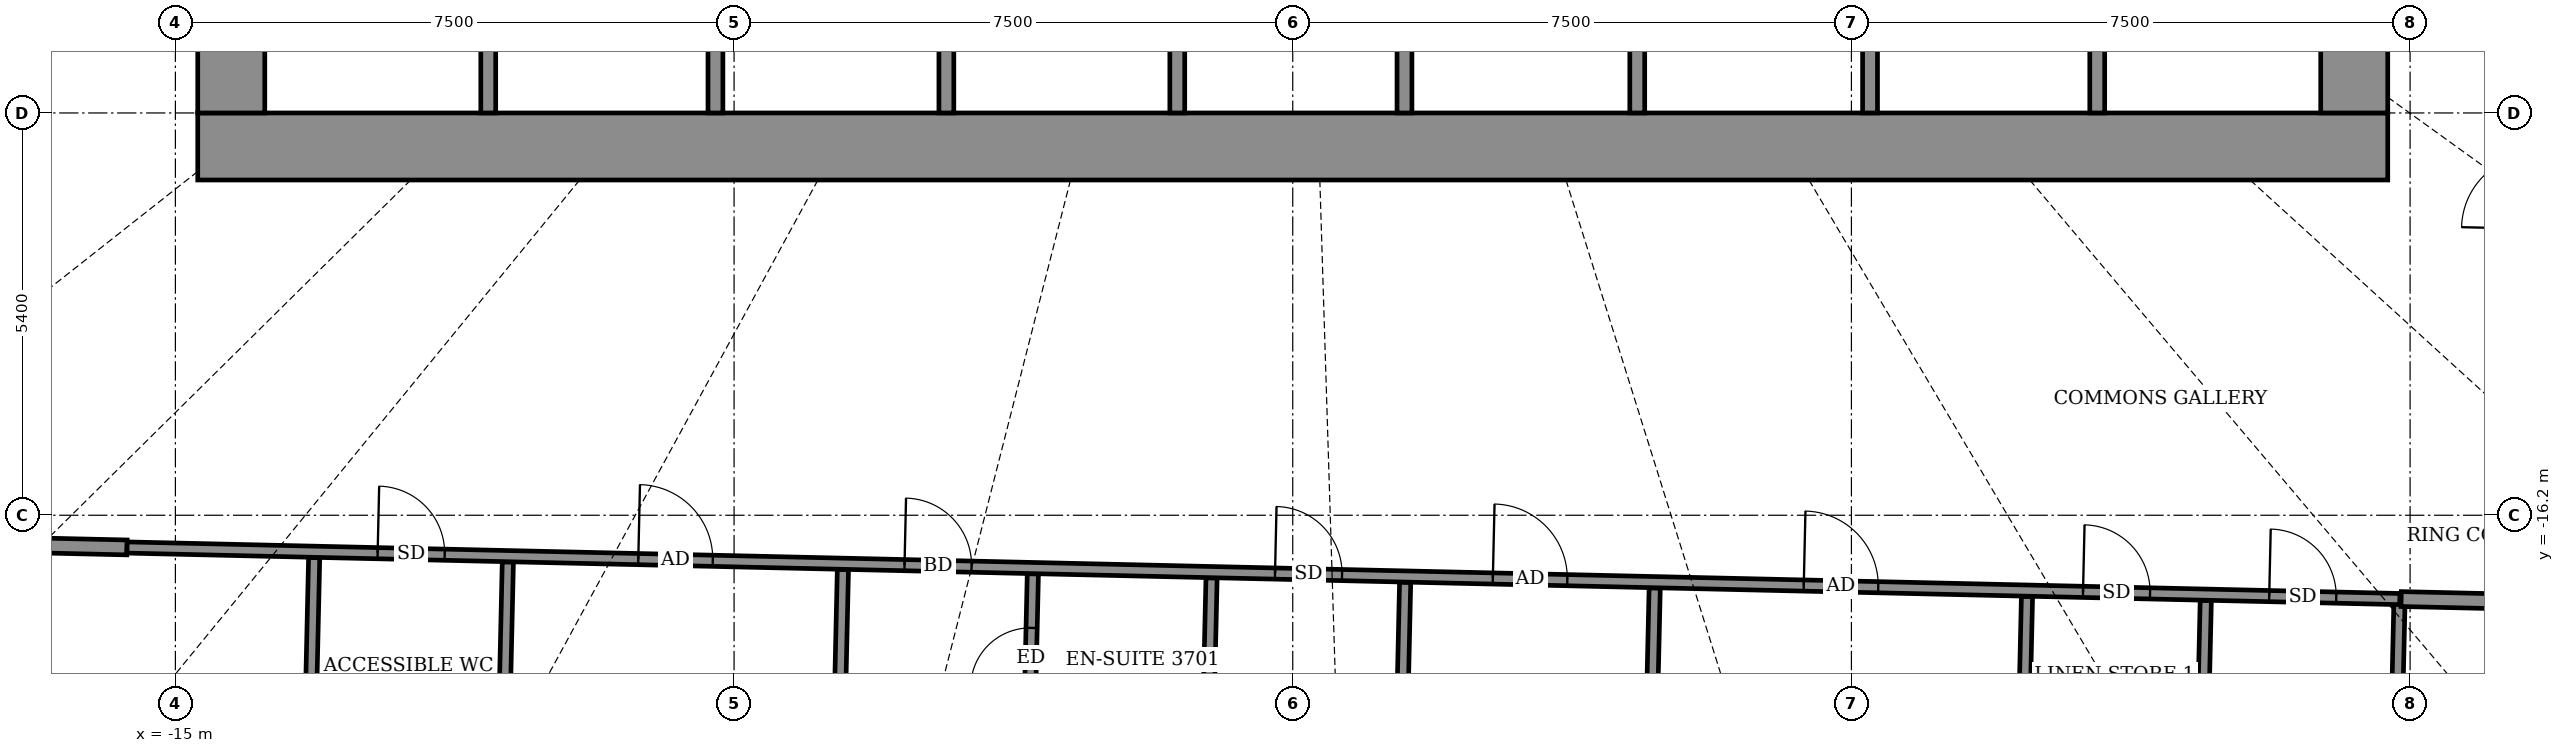
"""IFC4 building model, lengths in metres.
Left out: names, types, materials, properties, quantities, classifications, styles, units other than length and angle.
Written with IfcOpenShell. Run it as: python <this file> out.ifc"""

import sys

from ifc_helpers import new_model, si_unit, direction, frame, frame_2d, origin, place, context, subcontext, project, spatial, rectangle, extrude, element, fill, save


model = new_model("IFC4")
c1 = context("Model", 3, precision=1e-05, world=origin(), true_north=direction((0.0, 1.0)))
c2 = subcontext(c1, "Body", "Model", "MODEL_VIEW")
j1 = project(units=[si_unit("LENGTHUNIT", "METRE"), si_unit("PLANEANGLEUNIT", "RADIAN")], contexts=[c1])
p1 = place(None, origin())
s1 = spatial("IfcSite", under=j1, at=p1, CompositionType="ELEMENT")
p2 = place(p1, origin())
s2 = spatial("IfcBuilding", under=s1, at=p2, CompositionType="ELEMENT")
p3 = place(p2, frame((0.0, 0.0, 148.1)))
s3 = spatial("IfcBuildingStorey", under=s2, at=p3, CompositionType="ELEMENT", Elevation=148.1)
p4 = place(p3, frame((-10.686, -23.377, 0.0), z_axis=(0.0, 0.0, 1.0), x_axis=(0.022734104141, 0.999741546855, 0.0)))
e1 = element("IfcWall", 1, at=p4, inside=s3, PredefinedType="PARTITIONING", context=c2, shape_type="SweptSolid", body=[
    extrude(rectangle(XDim=6.551, YDim=0.15, at=frame_2d((3.275, 0.0))), origin(), (0.0, 0.0, 1.0), 2.65),
])
p5 = place(p3, frame((-6.187, -23.479, 0.0), z_axis=(0.0, 0.0, 1.0), x_axis=(0.022585104341, 0.999744923999, 0.0)))
e2 = element("IfcWall", 2, at=p5, inside=s3, PredefinedType="PARTITIONING", context=c2, shape_type="SweptSolid", body=[
    extrude(rectangle(XDim=6.551, YDim=0.15, at=frame_2d((3.275, 0.0))), origin(), (0.0, 0.0, 1.0), 2.75),
])
p6 = place(p3, frame((-1.239, -23.591, 0.0), z_axis=(0.0, 0.0, 1.0), x_axis=(0.022734104141, 0.999741546855, 0.0)))
e3 = element("IfcWall", 3, at=p6, inside=s3, PredefinedType="PARTITIONING", context=c2, shape_type="SweptSolid", body=[
    extrude(rectangle(XDim=6.551, YDim=0.15, at=frame_2d((3.275, 0.0))), origin(), (0.0, 0.0, 1.0), 4.05),
])
p7 = place(p3, frame((4.71, -23.726, 0.0), z_axis=(0.0, 0.0, 1.0), x_axis=(0.022734104141, 0.999741546855, 0.0)))
e4 = element("IfcWall", 4, at=p7, inside=s3, PredefinedType="PARTITIONING", context=c2, shape_type="SweptSolid", body=[
    extrude(rectangle(XDim=6.551, YDim=0.15, at=frame_2d((3.275, 0.0))), origin(), (0.0, 0.0, 1.0), 2.75),
])
p8 = place(p3, frame((12.108, -23.894, 0.0), z_axis=(0.0, 0.0, 1.0), x_axis=(0.022771353855, 0.999740699103, 0.0)))
e5 = element("IfcWall", 5, at=p8, inside=s3, PredefinedType="PARTITIONING", context=c2, shape_type="SweptSolid", body=[
    extrude(rectangle(XDim=6.551, YDim=0.15, at=frame_2d((3.275, 0.0))), origin(), (0.0, 0.0, 1.0), 2.65),
])
p9 = place(p3, frame((-13.203, -19.693, 0.0), z_axis=(0.0, 0.0, 1.0), x_axis=(0.022537481811, 0.999745998698, 0.0)))
e6 = element("IfcWall", 6, at=p9, inside=s3, PredefinedType="PARTITIONING", context=c2, shape_type="SweptSolid", body=[
    extrude(rectangle(XDim=2.925, YDim=0.15, at=frame_2d((1.462, 0.0))), origin(), (0.0, 0.0, 1.0), 2.45),
])
p10 = place(p3, frame((1.443, -20.025, 0.0), z_axis=(0.0, 0.0, 1.0), x_axis=(0.022539362742, 0.999745956294, 0.0)))
e7 = element("IfcWall", 7, at=p10, inside=s3, PredefinedType="PARTITIONING", context=c2, shape_type="SweptSolid", body=[
    extrude(rectangle(XDim=2.925, YDim=0.15, at=frame_2d((1.462, 0.0))), origin(), (0.0, 0.0, 1.0), 4.05),
])
p11 = place(p3, frame((14.79, -20.328, 0.0), z_axis=(0.0, 0.0, 1.0), x_axis=(0.02262711266, 0.999743974112, 0.0)))
e8 = element("IfcWall", 8, at=p11, inside=s3, PredefinedType="PARTITIONING", context=c2, shape_type="SweptSolid", body=[
    extrude(rectangle(XDim=3.0, YDim=0.15, at=frame_2d((1.5, 0.0))), origin(), (0.0, 0.0, 1.0), 2.65),
])
p12 = place(p3, frame((-3.542, -19.312, 0.0), z_axis=(0.0, 0.0, 1.0), x_axis=(0.022781023197, 0.999740478815, 0.0)))
e9 = element("IfcWall", 9, at=p12, inside=s3, PredefinedType="PARTITIONING", context=c2, shape_type="SweptSolid", body=[
    extrude(rectangle(XDim=2.325, YDim=0.15, at=frame_2d((1.163, 0.0))), origin(), (0.0, 0.0, 1.0), 4.05),
])
p13 = place(p12, frame((0.8, 0.0, 0.0)))
e10 = element("IfcOpeningElement", 10, at=p13, cuts=e9, PredefinedType="OPENING", context=c2, shape_type="SweptSolid", body=[
    extrude(rectangle(XDim=0.8, YDim=2.1, at=frame_2d((0.4, 1.05))), frame((0.0, 0.085, 0.0), z_axis=(0.0, -1.0, 0.0), x_axis=(1.0, 0.0, 0.0)), (0.0, 0.0, 1.0), 0.17),
])
p14 = place(p3, frame((9.809, -19.415, 0.0), z_axis=(0.0, 0.0, 1.0), x_axis=(0.02251267524, 0.99974655761, 0.0)))
e11 = element("IfcWall", 11, at=p14, inside=s3, PredefinedType="PARTITIONING", context=c2, shape_type="SweptSolid", body=[
    extrude(rectangle(XDim=2.125, YDim=0.15, at=frame_2d((1.063, 0.0))), origin(), (0.0, 0.0, 1.0), 2.65),
])
p15 = place(p3, frame((-21.983, -16.489, 0.0), z_axis=(0.0, 0.0, 1.0), x_axis=(0.999744930163, -0.022584831499, 0.0)))
e12 = element("IfcWall", 12, at=p15, inside=s3, PredefinedType="PARTITIONING", context=c2, shape_type="SweptSolid", body=[
    extrude(rectangle(XDim=6.335, YDim=0.2, at=frame_2d((3.167, 0.0))), origin(), (0.0, 0.0, 1.0), 2.55),
])
p16 = place(p15, frame((3.225, 0.0, 0.0)))
e13 = element("IfcOpeningElement", 13, at=p16, cuts=e12, PredefinedType="OPENING", context=c2, shape_type="SweptSolid", body=[
    extrude(rectangle(XDim=1.0, YDim=2.1, at=frame_2d((0.5, 1.05))), frame((0.0, 0.11, 0.0), z_axis=(0.0, -1.0, 0.0), x_axis=(1.0, 0.0, 0.0)), (0.0, 0.0, 1.0), 0.22),
])
p17 = place(p3, frame((-15.649, -16.633, 0.0), z_axis=(0.0, 0.0, 1.0), x_axis=(0.999742978268, -0.022671069754, 0.0)))
e14 = element("IfcWall", 14, at=p17, inside=s3, PredefinedType="PARTITIONING", context=c2, shape_type="SweptSolid", body=[
    extrude(rectangle(XDim=30.519, YDim=0.15, at=frame_2d((15.259, 0.0))), origin(), (0.0, 0.0, 1.0), 2.45),
])
p18 = place(p17, frame((3.365, 0.0, 0.0)))
e15 = element("IfcOpeningElement", 15, at=p18, cuts=e14, PredefinedType="OPENING", context=c2, shape_type="SweptSolid", body=[
    extrude(rectangle(XDim=0.9, YDim=2.1, at=frame_2d((0.45, 1.05))), frame((0.0, 0.085, 0.0), z_axis=(0.0, -1.0, 0.0), x_axis=(1.0, 0.0, 0.0)), (0.0, 0.0, 1.0), 0.17),
])
p19 = place(p17, frame((6.865, 0.0, 0.0)))
e16 = element("IfcOpeningElement", 16, at=p19, cuts=e14, PredefinedType="OPENING", context=c2, shape_type="SweptSolid", body=[
    extrude(rectangle(XDim=1.0, YDim=2.1, at=frame_2d((0.5, 1.05))), frame((0.0, 0.085, 0.0), z_axis=(0.0, -1.0, 0.0), x_axis=(1.0, 0.0, 0.0)), (0.0, 0.0, 1.0), 0.17),
])
p20 = place(p17, frame((10.44, 0.0, 0.0)))
e17 = element("IfcOpeningElement", 17, at=p20, cuts=e14, PredefinedType="OPENING", context=c2, shape_type="SweptSolid", body=[
    extrude(rectangle(XDim=0.9, YDim=2.1, at=frame_2d((0.45, 1.05))), frame((0.0, 0.085, 0.0), z_axis=(0.0, -1.0, 0.0), x_axis=(1.0, 0.0, 0.0)), (0.0, 0.0, 1.0), 0.17),
])
p21 = place(p17, frame((18.34, 0.0, 0.0)))
e18 = element("IfcOpeningElement", 18, at=p21, cuts=e14, PredefinedType="OPENING", context=c2, shape_type="SweptSolid", body=[
    extrude(rectangle(XDim=1.0, YDim=2.1, at=frame_2d((0.5, 1.05))), frame((0.0, 0.085, 0.0), z_axis=(0.0, -1.0, 0.0), x_axis=(1.0, 0.0, 0.0)), (0.0, 0.0, 1.0), 0.17),
])
p22 = place(p17, frame((15.415, 0.0, 0.0)))
e19 = element("IfcOpeningElement", 19, at=p22, cuts=e14, PredefinedType="OPENING", context=c2, shape_type="SweptSolid", body=[
    extrude(rectangle(XDim=0.9, YDim=2.1, at=frame_2d((0.45, 1.05))), frame((0.0, 0.085, 0.0), z_axis=(0.0, -1.0, 0.0), x_axis=(1.0, 0.0, 0.0)), (0.0, 0.0, 1.0), 0.17),
])
p23 = place(p17, frame((22.515, 0.0, 0.0)))
e20 = element("IfcOpeningElement", 20, at=p23, cuts=e14, PredefinedType="OPENING", context=c2, shape_type="SweptSolid", body=[
    extrude(rectangle(XDim=1.0, YDim=2.1, at=frame_2d((0.5, 1.05))), frame((0.0, 0.085, 0.0), z_axis=(0.0, -1.0, 0.0), x_axis=(1.0, 0.0, 0.0)), (0.0, 0.0, 1.0), 0.17),
])
p24 = place(p17, frame((26.265, 0.0, 0.0)))
e21 = element("IfcOpeningElement", 21, at=p24, cuts=e14, PredefinedType="OPENING", context=c2, shape_type="SweptSolid", body=[
    extrude(rectangle(XDim=0.9, YDim=2.1, at=frame_2d((0.45, 1.05))), frame((0.0, 0.085, 0.0), z_axis=(0.0, -1.0, 0.0), x_axis=(1.0, 0.0, 0.0)), (0.0, 0.0, 1.0), 0.17),
])
p25 = place(p17, frame((28.765, 0.0, 0.0)))
e22 = element("IfcOpeningElement", 22, at=p25, cuts=e14, PredefinedType="OPENING", context=c2, shape_type="SweptSolid", body=[
    extrude(rectangle(XDim=0.9, YDim=2.1, at=frame_2d((0.45, 1.05))), frame((0.0, 0.085, 0.0), z_axis=(0.0, -1.0, 0.0), x_axis=(1.0, 0.0, 0.0)), (0.0, 0.0, 1.0), 0.17),
])
p26 = place(p3, frame((14.88, -17.325, 0.0), z_axis=(0.0, 0.0, 1.0), x_axis=(0.999741618182, -0.022730967319, 0.0)))
e23 = element("IfcWall", 23, at=p26, inside=s3, PredefinedType="PARTITIONING", context=c2, shape_type="SweptSolid", body=[
    extrude(rectangle(XDim=6.38, YDim=0.2, at=frame_2d((3.19, 0.0))), origin(), (0.0, 0.0, 1.0), 2.65),
])
p27 = place(p3, frame((-17.32, -15.098, 0.0), z_axis=(0.0, 0.0, 1.0), x_axis=(0.022694293906, 0.999742451346, 0.0)))
e24 = element("IfcWall", 24, at=p27, inside=s3, PredefinedType="PARTITIONING", context=c2, shape_type="SweptSolid", body=[
    extrude(rectangle(XDim=28.024, YDim=0.2, at=frame_2d((14.012, 0.0))), origin(), (0.0, 0.0, 1.0), 2.55),
])
p28 = place(p27, frame((22.587, 0.0, 0.0)))
e25 = element("IfcOpeningElement", 25, at=p28, cuts=e24, PredefinedType="OPENING", context=c2, shape_type="SweptSolid", body=[
    extrude(rectangle(XDim=1.0, YDim=2.1, at=frame_2d((0.5, 1.05))), frame((0.0, 0.11, 0.0), z_axis=(0.0, -1.0, 0.0), x_axis=(1.0, 0.0, 0.0)), (0.0, 0.0, 1.0), 0.22),
])
p29 = place(p27, frame((26.274, 0.0, 0.0)))
e26 = element("IfcOpeningElement", 26, at=p29, cuts=e24, PredefinedType="OPENING", context=c2, shape_type="SweptSolid", body=[
    extrude(rectangle(XDim=0.9, YDim=2.1, at=frame_2d((0.45, 1.05))), frame((0.0, 0.11, 0.0), z_axis=(0.0, -1.0, 0.0), x_axis=(1.0, 0.0, 0.0)), (0.0, 0.0, 1.0), 0.22),
])
p30 = place(p27, frame((15.049, 0.0, 0.0)))
e27 = element("IfcOpeningElement", 27, at=p30, cuts=e24, PredefinedType="OPENING", context=c2, shape_type="SweptSolid", body=[
    extrude(rectangle(XDim=1.0, YDim=2.1, at=frame_2d((0.5, 1.05))), frame((0.0, 0.11, 0.0), z_axis=(0.0, -1.0, 0.0), x_axis=(1.0, 0.0, 0.0)), (0.0, 0.0, 1.0), 0.22),
])
p31 = place(p27, frame((19.099, 0.0, 0.0)))
e28 = element("IfcOpeningElement", 28, at=p31, cuts=e24, PredefinedType="OPENING", context=c2, shape_type="SweptSolid", body=[
    extrude(rectangle(XDim=0.9, YDim=2.1, at=frame_2d((0.45, 1.05))), frame((0.0, 0.11, 0.0), z_axis=(0.0, -1.0, 0.0), x_axis=(1.0, 0.0, 0.0)), (0.0, 0.0, 1.0), 0.22),
])
p32 = place(p27, frame((9.543, 0.0, 0.0)))
e29 = element("IfcOpeningElement", 29, at=p32, cuts=e24, PredefinedType="OPENING", context=c2, shape_type="SweptSolid", body=[
    extrude(rectangle(XDim=1.0, YDim=2.1, at=frame_2d((0.5, 1.05))), frame((0.0, 0.11, 0.0), z_axis=(0.0, -1.0, 0.0), x_axis=(1.0, 0.0, 0.0)), (0.0, 0.0, 1.0), 0.22),
])
p33 = place(p27, frame((2.999, 0.0, 0.0)))
e30 = element("IfcOpeningElement", 30, at=p33, cuts=e24, PredefinedType="OPENING", context=c2, shape_type="SweptSolid", body=[
    extrude(rectangle(XDim=1.0, YDim=2.1, at=frame_2d((0.5, 1.05))), frame((0.0, 0.11, 0.0), z_axis=(0.0, -1.0, 0.0), x_axis=(1.0, 0.0, 0.0)), (0.0, 0.0, 1.0), 0.22),
])
p34 = place(p3, frame((-14.7, -11.25, 0.0), z_axis=(0.0, 0.0, 1.0), x_axis=(1.0, 0.0, 0.0)))
e31 = element("IfcWall", 31, at=p34, inside=s3, PredefinedType="SHEAR", context=c2, shape_type="SweptSolid", body=[
    extrude(rectangle(XDim=29.4, YDim=0.9, at=frame_2d((14.7, 0.0))), origin(), (0.0, 0.0, 1.0), 4.6),
])
p35 = place(p3, frame((-14.25, -10.8, 0.0), z_axis=(0.0, 0.0, 1.0), x_axis=(0.0, 1.0, 0.0)))
e32 = element("IfcWall", 32, at=p35, inside=s3, PredefinedType="SHEAR", context=c2, shape_type="SweptSolid", body=[
    extrude(rectangle(XDim=21.6, YDim=0.9, at=frame_2d((10.8, 0.0))), origin(), (0.0, 0.0, 1.0), 4.6),
])
p36 = place(p35, frame((8.25, 0.0, 0.0)))
e33 = element("IfcOpeningElement", 33, at=p36, cuts=e32, PredefinedType="OPENING", context=c2, shape_type="SweptSolid", body=[
    extrude(rectangle(XDim=1.2, YDim=2.1, at=frame_2d((0.6, 1.05))), frame((0.0, 0.46, 0.0), z_axis=(0.0, -1.0, 0.0), x_axis=(1.0, 0.0, 0.0)), (0.0, 0.0, 1.0), 0.92),
])
p37 = place(p35, frame((15.25, 0.0, 0.0)))
e34 = element("IfcOpeningElement", 34, at=p37, cuts=e32, PredefinedType="OPENING", context=c2, shape_type="SweptSolid", body=[
    extrude(rectangle(XDim=1.2, YDim=2.1, at=frame_2d((0.6, 1.05))), frame((0.0, 0.46, 0.0), z_axis=(0.0, -1.0, 0.0), x_axis=(1.0, 0.0, 0.0)), (0.0, 0.0, 1.0), 0.92),
])
p38 = place(p3, frame((14.25, -10.8, 0.0), z_axis=(0.0, 0.0, 1.0), x_axis=(0.0, 1.0, 0.0)))
e35 = element("IfcWall", 35, at=p38, inside=s3, PredefinedType="SHEAR", context=c2, shape_type="SweptSolid", body=[
    extrude(rectangle(XDim=21.6, YDim=0.9, at=frame_2d((10.8, 0.0))), origin(), (0.0, 0.0, 1.0), 4.6),
])
p39 = place(p38, frame((1.2, 0.0, 0.0)))
e36 = element("IfcOpeningElement", 36, at=p39, cuts=e35, PredefinedType="OPENING", context=c2, shape_type="SweptSolid", body=[
    extrude(rectangle(XDim=1.2, YDim=2.1, at=frame_2d((0.6, 1.05))), frame((0.0, 0.46, 0.0), z_axis=(0.0, -1.0, 0.0), x_axis=(1.0, 0.0, 0.0)), (0.0, 0.0, 1.0), 0.92),
])
for number, where, z_axis, x_axis in (
    (37, (-10.8, -10.8, 0.0), (0.0, 0.0, 1.0), (0.0, 1.0, 0.0)),
    (38, (-7.75, -10.8, 0.0), (0.0, 0.0, 1.0), (0.0, 1.0, 0.0)),
):
    element("IfcWall", number, at=place(p3, frame(where, z_axis=z_axis, x_axis=x_axis)), inside=s3, PredefinedType="SHEAR", context=c2, shape_type="SweptSolid", body=[
        extrude(rectangle(XDim=7.5, YDim=0.2, at=frame_2d((3.75, 0.0))), origin(), (0.0, 0.0, 1.0), 4.05),
    ])
p40 = place(p3, frame((-1.55, -10.8, 0.0), z_axis=(0.0, 0.0, 1.0), x_axis=(0.0, 1.0, 0.0)))
e39 = element("IfcWall", 39, at=p40, inside=s3, PredefinedType="SHEAR", context=c2, shape_type="SweptSolid", body=[
    extrude(rectangle(XDim=7.5, YDim=0.2, at=frame_2d((3.75, 0.0))), origin(), (0.0, 0.0, 1.0), 4.05),
])
p41 = place(p40, frame((6.3, 0.0, 0.0)))
e40 = element("IfcOpeningElement", 40, at=p41, cuts=e39, PredefinedType="OPENING", context=c2, shape_type="SweptSolid", body=[
    extrude(rectangle(XDim=1.0, YDim=2.1, at=frame_2d((0.5, 1.05))), frame((0.0, 0.11, 0.0), z_axis=(0.0, -1.0, 0.0), x_axis=(1.0, 0.0, 0.0)), (0.0, 0.0, 1.0), 0.22),
])
p42 = place(p3, frame((1.5, -10.8, 0.0), z_axis=(0.0, 0.0, 1.0), x_axis=(0.0, 1.0, 0.0)))
e41 = element("IfcWall", 41, at=p42, inside=s3, PredefinedType="SHEAR", context=c2, shape_type="SweptSolid", body=[
    extrude(rectangle(XDim=7.5, YDim=0.2, at=frame_2d((3.75, 0.0))), origin(), (0.0, 0.0, 1.0), 4.05),
])
p43 = place(p42, frame((6.3, 0.0, 0.0)))
e42 = element("IfcOpeningElement", 42, at=p43, cuts=e41, PredefinedType="OPENING", context=c2, shape_type="SweptSolid", body=[
    extrude(rectangle(XDim=1.0, YDim=2.1, at=frame_2d((0.5, 1.05))), frame((0.0, 0.11, 0.0), z_axis=(0.0, -1.0, 0.0), x_axis=(1.0, 0.0, 0.0)), (0.0, 0.0, 1.0), 0.22),
])
p44 = place(p3, frame((7.75, -10.8, 0.0), z_axis=(0.0, 0.0, 1.0), x_axis=(0.0, 1.0, 0.0)))
e43 = element("IfcWall", 43, at=p44, inside=s3, PredefinedType="SHEAR", context=c2, shape_type="SweptSolid", body=[
    extrude(rectangle(XDim=7.5, YDim=0.2, at=frame_2d((3.75, 0.0))), origin(), (0.0, 0.0, 1.0), 4.05),
])
p45 = place(p44, frame((6.3, 0.0, 0.0)))
e44 = element("IfcOpeningElement", 44, at=p45, cuts=e43, PredefinedType="OPENING", context=c2, shape_type="SweptSolid", body=[
    extrude(rectangle(XDim=1.0, YDim=2.1, at=frame_2d((0.5, 1.05))), frame((0.0, 0.11, 0.0), z_axis=(0.0, -1.0, 0.0), x_axis=(1.0, 0.0, 0.0)), (0.0, 0.0, 1.0), 0.22),
])
p46 = place(p3, frame((10.8, -10.8, 0.0), z_axis=(0.0, 0.0, 1.0), x_axis=(0.0, 1.0, 0.0)))
e45 = element("IfcWall", 45, at=p46, inside=s3, PredefinedType="SHEAR", context=c2, shape_type="SweptSolid", body=[
    extrude(rectangle(XDim=7.5, YDim=0.2, at=frame_2d((3.75, 0.0))), origin(), (0.0, 0.0, 1.0), 4.05),
])
for number, where, z_axis, x_axis in (
    (46, (-4.65, -10.8, 0.0), (0.0, 0.0, 1.0), (0.0, 1.0, 0.0)),
    (47, (4.625, -10.8, 0.0), (0.0, 0.0, 1.0), (0.0, 1.0, 0.0)),
):
    element("IfcWall", number, at=place(p3, frame(where, z_axis=z_axis, x_axis=x_axis)), inside=s3, PredefinedType="SHEAR", context=c2, shape_type="SweptSolid", body=[
        extrude(rectangle(XDim=2.7, YDim=0.2, at=frame_2d((1.35, 0.0))), origin(), (0.0, 0.0, 1.0), 4.05),
    ])
p47 = place(p18, origin())
e48 = element("IfcDoor", 48, at=p47, inside=s3, OperationType="SINGLE_SWING_LEFT", PredefinedType="DOOR", context=c2, shape_type="SweptSolid", body=[
    extrude(rectangle(XDim=0.9, YDim=2.1, at=frame_2d((0.45, 1.05))), frame((0.0, 0.025, 0.0), z_axis=(0.0, -1.0, 0.0), x_axis=(1.0, 0.0, 0.0)), (0.0, 0.0, 1.0), 0.05),
])
fill(e15, e48)
p48 = place(p19, origin())
e49 = element("IfcDoor", 49, at=p48, inside=s3, OperationType="SINGLE_SWING_RIGHT", PredefinedType="DOOR", context=c2, shape_type="SweptSolid", body=[
    extrude(rectangle(XDim=1.0, YDim=2.1, at=frame_2d((0.5, 1.05))), frame((0.0, 0.025, 0.0), z_axis=(0.0, -1.0, 0.0), x_axis=(1.0, 0.0, 0.0)), (0.0, 0.0, 1.0), 0.05),
])
fill(e16, e49)
p49 = place(p20, origin())
e50 = element("IfcDoor", 50, at=p49, inside=s3, OperationType="SINGLE_SWING_LEFT", PredefinedType="DOOR", context=c2, shape_type="SweptSolid", body=[
    extrude(rectangle(XDim=0.9, YDim=2.1, at=frame_2d((0.45, 1.05))), frame((0.0, 0.025, 0.0), z_axis=(0.0, -1.0, 0.0), x_axis=(1.0, 0.0, 0.0)), (0.0, 0.0, 1.0), 0.05),
])
fill(e17, e50)
p50 = place(p13, origin())
e51 = element("IfcDoor", 51, at=p50, inside=s3, OperationType="SINGLE_SWING_LEFT", PredefinedType="DOOR", context=c2, shape_type="SweptSolid", body=[
    extrude(rectangle(XDim=0.8, YDim=2.1, at=frame_2d((0.4, 1.05))), frame((0.0, 0.025, 0.0), z_axis=(0.0, -1.0, 0.0), x_axis=(1.0, 0.0, 0.0)), (0.0, 0.0, 1.0), 0.05),
])
fill(e10, e51)
p51 = place(p21, origin())
e52 = element("IfcDoor", 52, at=p51, inside=s3, OperationType="SINGLE_SWING_LEFT", PredefinedType="DOOR", context=c2, shape_type="SweptSolid", body=[
    extrude(rectangle(XDim=1.0, YDim=2.1, at=frame_2d((0.5, 1.05))), frame((0.0, 0.025, 0.0), z_axis=(0.0, -1.0, 0.0), x_axis=(1.0, 0.0, 0.0)), (0.0, 0.0, 1.0), 0.05),
])
fill(e18, e52)
p52 = place(p22, origin())
e53 = element("IfcDoor", 53, at=p52, inside=s3, OperationType="SINGLE_SWING_RIGHT", PredefinedType="DOOR", context=c2, shape_type="SweptSolid", body=[
    extrude(rectangle(XDim=0.9, YDim=2.1, at=frame_2d((0.45, 1.05))), frame((0.0, 0.025, 0.0), z_axis=(0.0, -1.0, 0.0), x_axis=(1.0, 0.0, 0.0)), (0.0, 0.0, 1.0), 0.05),
])
fill(e19, e53)
p53 = place(p23, origin())
e54 = element("IfcDoor", 54, at=p53, inside=s3, OperationType="SINGLE_SWING_RIGHT", PredefinedType="DOOR", context=c2, shape_type="SweptSolid", body=[
    extrude(rectangle(XDim=1.0, YDim=2.1, at=frame_2d((0.5, 1.05))), frame((0.0, 0.025, 0.0), z_axis=(0.0, -1.0, 0.0), x_axis=(1.0, 0.0, 0.0)), (0.0, 0.0, 1.0), 0.05),
])
fill(e20, e54)
p54 = place(p24, origin())
e55 = element("IfcDoor", 55, at=p54, inside=s3, OperationType="SINGLE_SWING_LEFT", PredefinedType="DOOR", context=c2, shape_type="SweptSolid", body=[
    extrude(rectangle(XDim=0.9, YDim=2.1, at=frame_2d((0.45, 1.05))), frame((0.0, 0.025, 0.0), z_axis=(0.0, -1.0, 0.0), x_axis=(1.0, 0.0, 0.0)), (0.0, 0.0, 1.0), 0.05),
])
fill(e21, e55)
p55 = place(p25, origin())
e56 = element("IfcDoor", 56, at=p55, inside=s3, OperationType="SINGLE_SWING_RIGHT", PredefinedType="DOOR", context=c2, shape_type="SweptSolid", body=[
    extrude(rectangle(XDim=0.9, YDim=2.1, at=frame_2d((0.45, 1.05))), frame((0.0, 0.025, 0.0), z_axis=(0.0, -1.0, 0.0), x_axis=(1.0, 0.0, 0.0)), (0.0, 0.0, 1.0), 0.05),
])
fill(e22, e56)
save(model, sys.argv[1])
